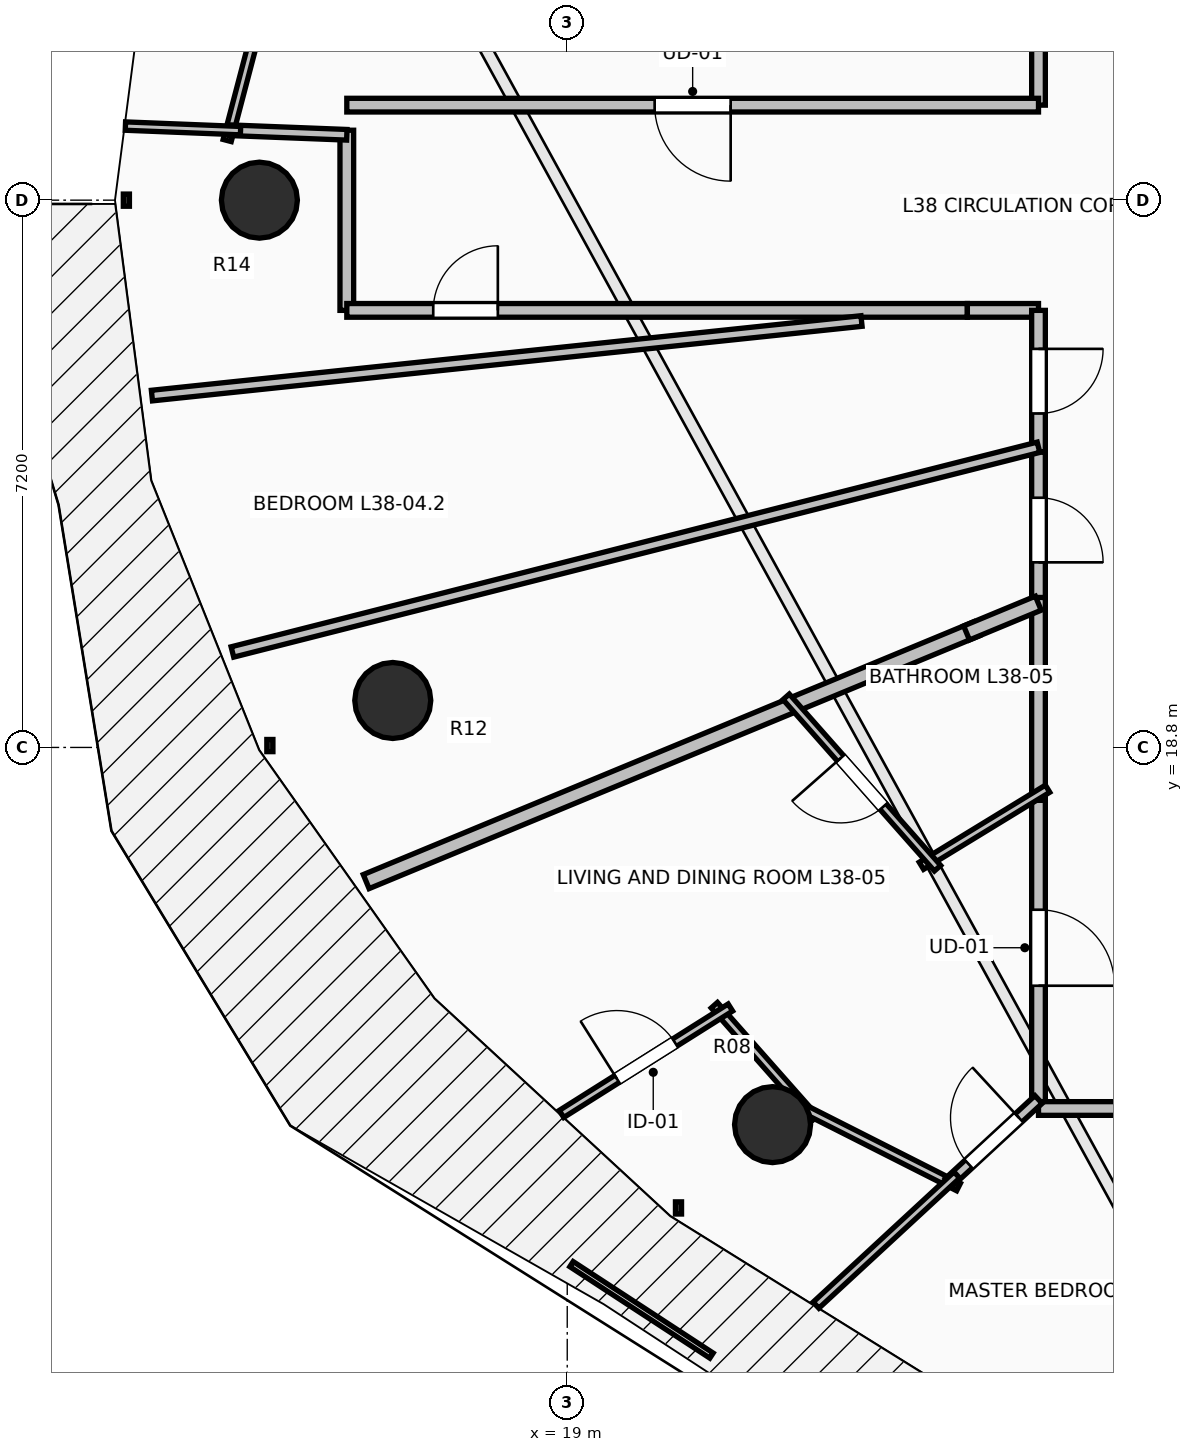
"""IFC4 building model, lengths in metres.
Left out: names, types, materials, properties, quantities, classifications, styles, units other than length and angle.
Written with IfcOpenShell. Run it as: python <this file> out.ifc"""

import sys

from ifc_helpers import new_model, si_unit, direction, frame, frame_2d, origin, origin_2d, place, context, subcontext, project, spatial, rectangle, circle, extrude, element, fill, save


model = new_model("IFC4")
c1 = context("Model", 3, precision=1e-05, world=origin(), true_north=direction((0.0, 1.0)))
c2 = subcontext(c1, "Body", "Model", "MODEL_VIEW")
j1 = project(units=[si_unit("LENGTHUNIT", "METRE"), si_unit("PLANEANGLEUNIT", "RADIAN")], contexts=[c1])
p1 = place(None, origin())
s1 = spatial("IfcSite", under=j1, at=p1, CompositionType="ELEMENT")
p2 = place(p1, origin())
s2 = spatial("IfcBuilding", under=s1, at=p2, CompositionType="ELEMENT")
p3 = place(p2, frame((0.0, 0.0, 143.1)))
s3 = spatial("IfcBuildingStorey", under=s2, at=p3, CompositionType="ELEMENT", Elevation=143.1)
for number, where, z_axis, x_axis in (
    (1, (14.95, 26.0, 0.0), (0.0, 0.0, 1.0), (-1.0, 0.0, 0.0)),
    (2, (16.705, 19.418, 0.0), (0.0, 0.0, 1.0), (-0.924, -0.383, 0.0)),
    (3, (21.701, 13.838, 0.0), (0.0, 0.0, 1.0), (-0.707, -0.707, 0.0)),
):
    element("IfcColumn", number, at=place(p3, frame(where, z_axis=z_axis, x_axis=x_axis)), inside=s3, PredefinedType="COLUMN", context=c2, shape_type="SweptSolid", body=[
        extrude(circle(Radius=0.5, at=origin_2d()), origin(), (0.0, 0.0, 1.0), 3.5),
    ])
p4 = place(p3, frame((25.2, 29.156, 0.0), z_axis=(0.0, 0.0, 1.0), x_axis=(0.0, -1.0, 0.0)))
e4 = element("IfcWall", 4, at=p4, inside=s3, PredefinedType="PARTITIONING", context=c2, shape_type="SweptSolid", body=[
    extrude(rectangle(XDim=1.906, YDim=0.18, at=frame_2d((0.953, 0.0))), origin(), (0.0, 0.0, 1.0), 2.432),
])
p5 = place(p3, frame((25.2, 27.25, 0.0), z_axis=(0.0, 0.0, 1.0), x_axis=(-1.0, 0.0, 0.0)))
e5 = element("IfcWall", 5, at=p5, inside=s3, PredefinedType="PARTITIONING", context=c2, shape_type="SweptSolid", body=[
    extrude(rectangle(XDim=9.1, YDim=0.18, at=frame_2d((4.55, 0.0))), origin(), (0.0, 0.0, 1.0), 2.432),
])
p6 = place(p5, frame((4.05, 0.0, 0.0)))
e6 = element("IfcOpeningElement", 6, at=p6, cuts=e5, PredefinedType="OPENING", context=c2, shape_type="SweptSolid", body=[
    extrude(rectangle(XDim=1.0, YDim=2.15, at=frame_2d((0.5, 1.075))), frame((0.0, 0.105, 0.0), z_axis=(0.0, -1.0, 0.0), x_axis=(1.0, 0.0, 0.0)), (0.0, 0.0, 1.0), 0.21),
])
p7 = place(p3, frame((16.1, 26.92, 0.0), z_axis=(0.0, 0.0, 1.0), x_axis=(0.0, -1.0, 0.0)))
e7 = element("IfcWall", 7, at=p7, inside=s3, PredefinedType="PARTITIONING", context=c2, shape_type="SweptSolid", body=[
    extrude(rectangle(XDim=2.37, YDim=0.18, at=frame_2d((1.185, 0.0))), origin(), (0.0, 0.0, 1.0), 2.432),
])
p8 = place(p3, frame((16.1, 24.55, 0.0), z_axis=(0.0, 0.0, 1.0), x_axis=(1.0, 0.0, 0.0)))
e8 = element("IfcWall", 8, at=p8, inside=s3, PredefinedType="PARTITIONING", context=c2, shape_type="SweptSolid", body=[
    extrude(rectangle(XDim=8.164, YDim=0.18, at=frame_2d((4.082, 0.0))), origin(), (0.0, 0.0, 1.0), 2.922),
])
p9 = place(p8, frame((1.137, 0.0, 0.0)))
e9 = element("IfcOpeningElement", 9, at=p9, cuts=e8, PredefinedType="OPENING", context=c2, shape_type="SweptSolid", body=[
    extrude(rectangle(XDim=0.85, YDim=2.1, at=frame_2d((0.425, 1.05))), frame((0.0, 0.105, 0.0), z_axis=(0.0, -1.0, 0.0), x_axis=(1.0, 0.0, 0.0)), (0.0, 0.0, 1.0), 0.21),
])
p10 = place(p3, frame((24.264, 24.55, 0.0), z_axis=(0.0, 0.0, 1.0), x_axis=(1.0, 0.0, 0.0)))
e10 = element("IfcWall", 10, at=p10, inside=s3, PredefinedType="PARTITIONING", context=c2, shape_type="SweptSolid", body=[
    extrude(rectangle(XDim=0.936, YDim=0.18, at=frame_2d((0.468, 0.0))), origin(), (0.0, 0.0, 1.0), 3.24),
])
p11 = place(p3, frame((25.2, 24.55, 0.0), z_axis=(0.0, 0.0, 1.0), x_axis=(0.0, -1.0, 0.0)))
e11 = element("IfcWall", 11, at=p11, inside=s3, PredefinedType="PARTITIONING", context=c2, shape_type="SweptSolid", body=[
    extrude(rectangle(XDim=1.863, YDim=0.18, at=frame_2d((0.932, 0.0))), origin(), (0.0, 0.0, 1.0), 3.24),
])
p12 = place(p11, frame((0.507, 0.0, 0.0)))
e12 = element("IfcOpeningElement", 12, at=p12, cuts=e11, PredefinedType="OPENING", context=c2, shape_type="SweptSolid", body=[
    extrude(rectangle(XDim=0.85, YDim=2.1, at=frame_2d((0.425, 1.05))), frame((0.0, 0.105, 0.0), z_axis=(0.0, -1.0, 0.0), x_axis=(1.0, 0.0, 0.0)), (0.0, 0.0, 1.0), 0.21),
])
p13 = place(p3, frame((25.2, 22.687, 0.0), z_axis=(0.0, 0.0, 1.0), x_axis=(0.0, -1.0, 0.0)))
e13 = element("IfcWall", 13, at=p13, inside=s3, PredefinedType="PARTITIONING", context=c2, shape_type="SweptSolid", body=[
    extrude(rectangle(XDim=2.054, YDim=0.18, at=frame_2d((1.027, 0.0))), origin(), (0.0, 0.0, 1.0), 3.24),
])
p14 = place(p13, frame((0.602, 0.0, 0.0)))
e14 = element("IfcOpeningElement", 14, at=p14, cuts=e13, PredefinedType="OPENING", context=c2, shape_type="SweptSolid", body=[
    extrude(rectangle(XDim=0.85, YDim=2.1, at=frame_2d((0.425, 1.05))), frame((0.0, 0.105, 0.0), z_axis=(0.0, -1.0, 0.0), x_axis=(1.0, 0.0, 0.0)), (0.0, 0.0, 1.0), 0.21),
])
p15 = place(p3, frame((25.2, 18.244, 0.0), z_axis=(0.0, 0.0, 1.0), x_axis=(0.0, -1.0, 0.0)))
e15 = element("IfcWall", 15, at=p15, inside=s3, PredefinedType="PARTITIONING", context=c2, shape_type="SweptSolid", body=[
    extrude(rectangle(XDim=4.158, YDim=0.18, at=frame_2d((2.079, 0.0))), origin(), (0.0, 0.0, 1.0), 2.432),
])
p16 = place(p15, frame((1.579, 0.0, 0.0)))
e16 = element("IfcOpeningElement", 16, at=p16, cuts=e15, PredefinedType="OPENING", context=c2, shape_type="SweptSolid", body=[
    extrude(rectangle(XDim=1.0, YDim=2.15, at=frame_2d((0.5, 1.075))), frame((0.0, 0.105, 0.0), z_axis=(0.0, -1.0, 0.0), x_axis=(1.0, 0.0, 0.0)), (0.0, 0.0, 1.0), 0.21),
])
p17 = place(p3, frame((25.2, 20.773, 0.0), z_axis=(0.0, 0.0, 1.0), x_axis=(0.0, -1.0, 0.0)))
e17 = element("IfcWall", 17, at=p17, inside=s3, PredefinedType="PARTITIONING", context=c2, shape_type="SweptSolid", body=[
    extrude(rectangle(XDim=2.669, YDim=0.18, at=frame_2d((1.334, 0.0))), origin(), (0.0, 0.0, 1.0), 3.24),
])
p18 = place(p3, frame((25.2, 14.05, 0.0), z_axis=(0.0, 0.0, 1.0), x_axis=(1.0, 0.0, 0.0)))
e18 = element("IfcWall", 18, at=p18, inside=s3, PredefinedType="PARTITIONING", context=c2, shape_type="SweptSolid", body=[
    extrude(rectangle(XDim=4.531, YDim=0.18, at=frame_2d((2.266, 0.0))), origin(), (0.0, 0.0, 1.0), 2.432),
])
p19 = place(p3, frame((15.689, 31.204, 0.0), z_axis=(0.0, 0.0, 1.0), x_axis=(-0.254346037576, -0.967113278354, 0.0)))
e19 = element("IfcWall", 19, at=p19, inside=s3, PredefinedType="PARTITIONING", context=c2, shape_type="SweptSolid", body=[
    extrude(rectangle(XDim=4.57, YDim=0.11, at=frame_2d((2.285, 0.0))), origin(), (0.0, 0.0, 1.0), 3.24),
])
p20 = place(p19, frame((1.835, 0.0, 0.0)))
e20 = element("IfcOpeningElement", 20, at=p20, cuts=e19, PredefinedType="OPENING", context=c2, shape_type="SweptSolid", body=[
    extrude(rectangle(XDim=0.9, YDim=2.1, at=frame_2d((0.45, 1.05))), frame((0.0, 0.07, 0.0), z_axis=(0.0, -1.0, 0.0), x_axis=(1.0, 0.0, 0.0)), (0.0, 0.0, 1.0), 0.14),
])
p21 = place(p3, frame((14.562, 26.92, 0.0), z_axis=(0.0, 0.0, 1.0), x_axis=(0.999244683777, -0.03885951548, 0.0)))
e21 = element("IfcWall", 21, at=p21, inside=s3, PredefinedType="PARTITIONING", context=c2, shape_type="SweptSolid", body=[
    extrude(rectangle(XDim=1.539, YDim=0.14, at=frame_2d((0.77, 0.0))), origin(), (0.0, 0.0, 1.0), 2.728),
])
p22 = place(p3, frame((13.187, 26.975, 0.0), z_axis=(0.0, 0.0, 1.0), x_axis=(0.999208657324, -0.039775106907, 0.0)))
e22 = element("IfcWall", 22, at=p22, inside=s3, PredefinedType="PARTITIONING", context=c2, shape_type="SweptSolid", body=[
    extrude(rectangle(XDim=1.516, YDim=0.11, at=frame_2d((0.758, 0.0))), origin(), (0.0, 0.0, 1.0), 3.24),
])
p23 = place(p3, frame((13.536, 23.429, 0.0), z_axis=(0.0, 0.0, 1.0), x_axis=(0.994524817277, 0.104500659427, 0.0)))
e23 = element("IfcWall", 23, at=p23, inside=s3, PredefinedType="PARTITIONING", context=c2, shape_type="SweptSolid", body=[
    extrude(rectangle(XDim=9.387, YDim=0.14, at=frame_2d((4.694, 0.0))), origin(), (0.0, 0.0, 1.0), 2.728),
])
p24 = place(p3, frame((14.595, 20.056, 0.0), z_axis=(0.0, 0.0, 1.0), x_axis=(0.969235416515, 0.246135546747, 0.0)))
e24 = element("IfcWall", 24, at=p24, inside=s3, PredefinedType="PARTITIONING", context=c2, shape_type="SweptSolid", body=[
    extrude(rectangle(XDim=10.942, YDim=0.14, at=frame_2d((5.471, 0.0))), origin(), (0.0, 0.0, 1.0), 2.728),
])
p25 = place(p3, frame((16.355, 17.035, 0.0), z_axis=(0.0, 0.0, 1.0), x_axis=(0.923885339237, 0.382669413387, 0.0)))
e25 = element("IfcWall", 25, at=p25, inside=s3, PredefinedType="PARTITIONING", context=c2, shape_type="SweptSolid", body=[
    extrude(rectangle(XDim=8.689, YDim=0.2, at=frame_2d((4.345, 0.0))), origin(), (0.0, 0.0, 1.0), 2.432),
])
p26 = place(p3, frame((24.254, 20.306, 0.0), z_axis=(0.0, 0.0, 1.0), x_axis=(0.923789545328, 0.382900608439, 0.0)))
e26 = element("IfcWall", 26, at=p26, inside=s3, PredefinedType="PARTITIONING", context=c2, shape_type="SweptSolid", body=[
    extrude(rectangle(XDim=1.021, YDim=0.2, at=frame_2d((0.511, 0.0))), origin(), (0.0, 0.0, 1.0), 3.24),
])
p27 = place(p3, frame((25.32, 18.257, 0.0), z_axis=(0.0, 0.0, 1.0), x_axis=(-0.853368681548, -0.52130786811, 0.0)))
e27 = element("IfcWall", 27, at=p27, inside=s3, PredefinedType="PARTITIONING", context=c2, shape_type="SweptSolid", body=[
    extrude(rectangle(XDim=1.945, YDim=0.11, at=frame_2d((0.973, 0.0))), origin(), (0.0, 0.0, 1.0), 2.432),
])
p28 = place(p3, frame((23.872, 17.211, 0.0), z_axis=(0.0, 0.0, 1.0), x_axis=(-0.66196248337, 0.74953697081, 0.0)))
e28 = element("IfcWall", 28, at=p28, inside=s3, PredefinedType="PARTITIONING", context=c2, shape_type="SweptSolid", body=[
    extrude(rectangle(XDim=3.008, YDim=0.11, at=frame_2d((1.504, 0.0))), origin(), (0.0, 0.0, 1.0), 2.432),
])
p29 = place(p28, frame((1.079, 0.0, 0.0)))
e29 = element("IfcOpeningElement", 29, at=p29, cuts=e28, PredefinedType="OPENING", context=c2, shape_type="SweptSolid", body=[
    extrude(rectangle(XDim=0.85, YDim=2.1, at=frame_2d((0.425, 1.05))), frame((0.0, 0.07, 0.0), z_axis=(0.0, -1.0, 0.0), x_axis=(1.0, 0.0, 0.0)), (0.0, 0.0, 1.0), 0.14),
])
p30 = place(p3, frame((20.935, 15.409, 0.0), z_axis=(0.0, 0.0, 1.0), x_axis=(0.66216897397, -0.749354555542, 0.0)))
e30 = element("IfcWall", 30, at=p30, inside=s3, PredefinedType="PARTITIONING", context=c2, shape_type="SweptSolid", body=[
    extrude(rectangle(XDim=1.991, YDim=0.11, at=frame_2d((0.996, 0.0))), origin(), (0.0, 0.0, 1.0), 2.432),
])
p31 = place(p3, frame((22.036, 14.085, 0.0), z_axis=(0.0, 0.0, 1.0), x_axis=(0.892312874209, -0.451417472548, 0.0)))
e31 = element("IfcWall", 31, at=p31, inside=s3, PredefinedType="PARTITIONING", context=c2, shape_type="SweptSolid", body=[
    extrude(rectangle(XDim=2.367, YDim=0.11, at=frame_2d((1.183, 0.0))), origin(), (0.0, 0.0, 1.0), 2.432),
])
p32 = place(p3, frame((18.925, 13.979, 0.0), z_axis=(0.0, 0.0, 1.0), x_axis=(0.846034075758, 0.533128823697, 0.0)))
e32 = element("IfcWall", 32, at=p32, inside=s3, PredefinedType="PARTITIONING", context=c2, shape_type="SweptSolid", body=[
    extrude(rectangle(XDim=2.626, YDim=0.11, at=frame_2d((1.313, 0.0))), origin(), (0.0, 0.0, 1.0), 2.728),
])
p33 = place(p32, frame((0.863, 0.0, 0.0)))
e33 = element("IfcOpeningElement", 33, at=p33, cuts=e32, PredefinedType="OPENING", context=c2, shape_type="SweptSolid", body=[
    extrude(rectangle(XDim=0.9, YDim=2.1, at=frame_2d((0.45, 1.05))), frame((0.0, 0.07, 0.0), z_axis=(0.0, -1.0, 0.0), x_axis=(1.0, 0.0, 0.0)), (0.0, 0.0, 1.0), 0.14),
])
p34 = place(p3, frame((24.023, 13.08, 0.0), z_axis=(0.0, 0.0, 1.0), x_axis=(0.734359451791, 0.678760779336, 0.0)))
e34 = element("IfcWall", 34, at=p34, inside=s3, PredefinedType="PARTITIONING", context=c2, shape_type="SweptSolid", body=[
    extrude(rectangle(XDim=1.603, YDim=0.14, at=frame_2d((0.801, 0.0))), origin(), (0.0, 0.0, 1.0), 2.922),
])
p35 = place(p34, frame((0.351, 0.0, 0.0)))
e35 = element("IfcOpeningElement", 35, at=p35, cuts=e34, PredefinedType="OPENING", context=c2, shape_type="SweptSolid", body=[
    extrude(rectangle(XDim=0.9, YDim=2.1, at=frame_2d((0.45, 1.05))), frame((0.0, 0.085, 0.0), z_axis=(0.0, -1.0, 0.0), x_axis=(1.0, 0.0, 0.0)), (0.0, 0.0, 1.0), 0.17),
])
p36 = place(p3, frame((22.273, 11.463, 0.0), z_axis=(0.0, 0.0, 1.0), x_axis=(0.73438401738, 0.678734200565, 0.0)))
e36 = element("IfcWall", 36, at=p36, inside=s3, PredefinedType="PARTITIONING", context=c2, shape_type="SweptSolid", body=[
    extrude(rectangle(XDim=2.522, YDim=0.11, at=frame_2d((1.261, 0.0))), origin(), (0.0, 0.0, 1.0), 2.728),
])
p37 = place(p6, origin())
e37 = element("IfcDoor", 37, at=p37, inside=s3, OperationType="SINGLE_SWING_LEFT", PredefinedType="DOOR", context=c2, shape_type="SweptSolid", body=[
    extrude(rectangle(XDim=1.0, YDim=2.15, at=frame_2d((0.5, 1.075))), frame((0.0, 0.025, 0.0), z_axis=(0.0, -1.0, 0.0), x_axis=(1.0, 0.0, 0.0)), (0.0, 0.0, 1.0), 0.05),
])
fill(e6, e37)
p38 = place(p16, origin())
e38 = element("IfcDoor", 38, at=p38, inside=s3, OperationType="SINGLE_SWING_RIGHT", PredefinedType="DOOR", context=c2, shape_type="SweptSolid", body=[
    extrude(rectangle(XDim=1.0, YDim=2.15, at=frame_2d((0.5, 1.075))), frame((0.0, 0.025, 0.0), z_axis=(0.0, -1.0, 0.0), x_axis=(1.0, 0.0, 0.0)), (0.0, 0.0, 1.0), 0.05),
])
fill(e16, e38)
p39 = place(p29, origin())
e39 = element("IfcDoor", 39, at=p39, inside=s3, OperationType="SINGLE_SWING_RIGHT", PredefinedType="DOOR", context=c2, shape_type="SweptSolid", body=[
    extrude(rectangle(XDim=0.85, YDim=2.1, at=frame_2d((0.425, 1.05))), frame((0.0, 0.025, 0.0), z_axis=(0.0, -1.0, 0.0), x_axis=(1.0, 0.0, 0.0)), (0.0, 0.0, 1.0), 0.05),
])
fill(e29, e39)
p40 = place(p33, origin())
e40 = element("IfcDoor", 40, at=p40, inside=s3, OperationType="SINGLE_SWING_LEFT", PredefinedType="DOOR", context=c2, shape_type="SweptSolid", body=[
    extrude(rectangle(XDim=0.9, YDim=2.1, at=frame_2d((0.45, 1.05))), frame((0.0, 0.025, 0.0), z_axis=(0.0, -1.0, 0.0), x_axis=(1.0, 0.0, 0.0)), (0.0, 0.0, 1.0), 0.05),
])
fill(e33, e40)
p41 = place(p35, origin())
e41 = element("IfcDoor", 41, at=p41, inside=s3, OperationType="SINGLE_SWING_RIGHT", PredefinedType="DOOR", context=c2, shape_type="SweptSolid", body=[
    extrude(rectangle(XDim=0.9, YDim=2.1, at=frame_2d((0.45, 1.05))), frame((0.0, 0.025, 0.0), z_axis=(0.0, -1.0, 0.0), x_axis=(1.0, 0.0, 0.0)), (0.0, 0.0, 1.0), 0.05),
])
fill(e35, e41)
p42 = place(p9, origin())
e42 = element("IfcDoor", 42, at=p42, inside=s3, OperationType="SINGLE_SWING_RIGHT", PredefinedType="DOOR", context=c2, shape_type="SweptSolid", body=[
    extrude(rectangle(XDim=0.85, YDim=2.1, at=frame_2d((0.425, 1.05))), frame((0.0, 0.025, 0.0), z_axis=(0.0, -1.0, 0.0), x_axis=(1.0, 0.0, 0.0)), (0.0, 0.0, 1.0), 0.05),
])
fill(e9, e42)
p43 = place(p12, origin())
e43 = element("IfcDoor", 43, at=p43, inside=s3, OperationType="SINGLE_SWING_LEFT", PredefinedType="DOOR", context=c2, shape_type="SweptSolid", body=[
    extrude(rectangle(XDim=0.85, YDim=2.1, at=frame_2d((0.425, 1.05))), frame((0.0, 0.025, 0.0), z_axis=(0.0, -1.0, 0.0), x_axis=(1.0, 0.0, 0.0)), (0.0, 0.0, 1.0), 0.05),
])
fill(e12, e43)
p44 = place(p14, origin())
e44 = element("IfcDoor", 44, at=p44, inside=s3, OperationType="SINGLE_SWING_RIGHT", PredefinedType="DOOR", context=c2, shape_type="SweptSolid", body=[
    extrude(rectangle(XDim=0.85, YDim=2.1, at=frame_2d((0.425, 1.05))), frame((0.0, 0.025, 0.0), z_axis=(0.0, -1.0, 0.0), x_axis=(1.0, 0.0, 0.0)), (0.0, 0.0, 1.0), 0.05),
])
fill(e14, e44)
save(model, sys.argv[1])
